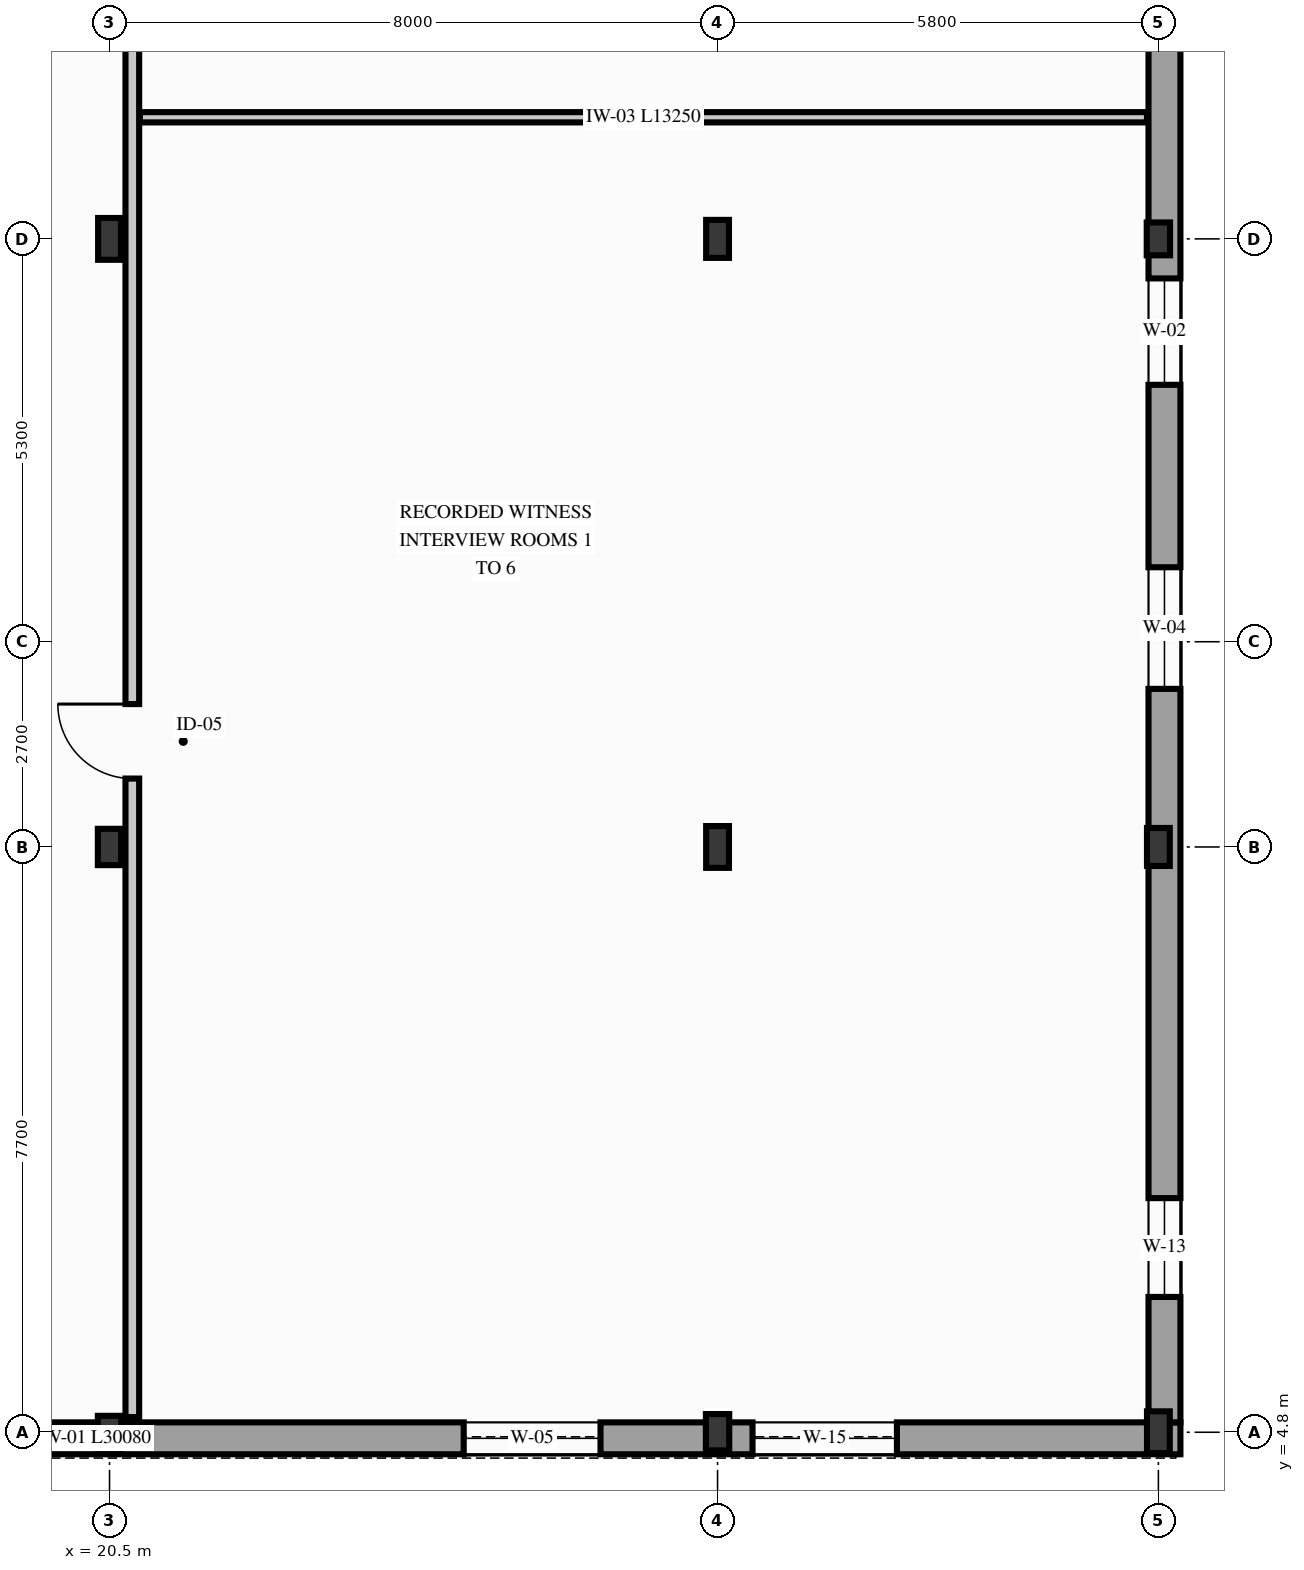
"""IFC4 building model, lengths in metres.
Left out: names, types, materials, properties, quantities, classifications, styles, units other than length and angle.
Written with IfcOpenShell. Run it as: python <this file> out.ifc"""

import sys

from ifc_helpers import new_model, si_unit, direction, frame, frame_2d, origin, origin_2d, place, context, subcontext, project, spatial, rectangle, i_section, extrude, element, fill, save


model = new_model("IFC4")
c1 = context("Model", 3, precision=1e-05, world=origin(), true_north=direction((0.0, 1.0)))
c2 = subcontext(c1, "Body", "Model", "MODEL_VIEW")
j1 = project(units=[si_unit("LENGTHUNIT", "METRE"), si_unit("PLANEANGLEUNIT", "RADIAN")], contexts=[c1])
p1 = place(None, origin())
s1 = spatial("IfcSite", under=j1, at=p1, CompositionType="ELEMENT")
p2 = place(p1, origin())
s2 = spatial("IfcBuilding", under=s1, at=p2, CompositionType="ELEMENT")
p3 = place(p2, frame((0.0, 0.0, 9.3)))
s3 = spatial("IfcBuildingStorey", under=s2, at=p3, CompositionType="ELEMENT", Elevation=9.3)
p4 = place(p3, frame((20.5, 4.8, 0.0), z_axis=(0.0, 0.0, 1.0), x_axis=(1.0, 0.0, 0.0)))
e1 = element("IfcColumn", 1, at=p4, inside=s3, PredefinedType="COLUMN", context=c2, shape_type="SweptSolid", body=[
    extrude(i_section(OverallWidth=0.307, OverallDepth=0.432, WebThickness=0.021, FlangeThickness=0.04, FilletRadius=0.027, at=origin_2d()), origin(), (0.0, 0.0, 1.0), 4.2),
])
p5 = place(p3, frame((20.5, 12.5, 0.0), z_axis=(0.0, 0.0, 1.0), x_axis=(1.0, 0.0, 0.0)))
e2 = element("IfcColumn", 2, at=p5, inside=s3, PredefinedType="COLUMN", context=c2, shape_type="SweptSolid", body=[
    extrude(i_section(OverallWidth=0.307, OverallDepth=0.478, WebThickness=0.021, FlangeThickness=0.04, FilletRadius=0.027, at=origin_2d()), origin(), (0.0, 0.0, 1.0), 4.2),
])
p6 = place(p3, frame((20.5, 20.5, 0.0), z_axis=(0.0, 0.0, 1.0), x_axis=(1.0, 0.0, 0.0)))
e3 = element("IfcColumn", 3, at=p6, inside=s3, PredefinedType="COLUMN", context=c2, shape_type="SweptSolid", body=[
    extrude(i_section(OverallWidth=0.3, OverallDepth=0.55, WebThickness=0.015, FlangeThickness=0.029, FilletRadius=0.027, at=origin_2d()), origin(), (0.0, 0.0, 1.0), 4.2),
])
p7 = place(p3, frame((28.5, 4.8, 0.0), z_axis=(0.0, 0.0, 1.0), x_axis=(1.0, 0.0, 0.0)))
e4 = element("IfcColumn", 4, at=p7, inside=s3, PredefinedType="COLUMN", context=c2, shape_type="SweptSolid", body=[
    extrude(i_section(OverallWidth=0.307, OverallDepth=0.478, WebThickness=0.021, FlangeThickness=0.04, FilletRadius=0.027, at=origin_2d()), origin(), (0.0, 0.0, 1.0), 3.94),
])
p8 = place(p3, frame((28.5, 12.5, 0.0), z_axis=(0.0, 0.0, 1.0), x_axis=(1.0, 0.0, 0.0)))
e5 = element("IfcColumn", 5, at=p8, inside=s3, PredefinedType="COLUMN", context=c2, shape_type="SweptSolid", body=[
    extrude(i_section(OverallWidth=0.3, OverallDepth=0.55, WebThickness=0.015, FlangeThickness=0.029, FilletRadius=0.027, at=origin_2d()), origin(), (0.0, 0.0, 1.0), 3.94),
])
p9 = place(p3, frame((28.5, 20.5, 0.0), z_axis=(0.0, 0.0, 1.0), x_axis=(1.0, 0.0, 0.0)))
e6 = element("IfcColumn", 6, at=p9, inside=s3, PredefinedType="COLUMN", context=c2, shape_type="SweptSolid", body=[
    extrude(i_section(OverallWidth=0.3, OverallDepth=0.5, WebThickness=0.014, FlangeThickness=0.028, FilletRadius=0.027, at=origin_2d()), origin(), (0.0, 0.0, 1.0), 3.94),
])
p10 = place(p3, frame((34.3, 4.8, 0.0), z_axis=(0.0, 0.0, 1.0), x_axis=(1.0, 0.0, 0.0)))
e7 = element("IfcColumn", 7, at=p10, inside=s3, PredefinedType="COLUMN", context=c2, shape_type="SweptSolid", body=[
    extrude(i_section(OverallWidth=0.3, OverallDepth=0.55, WebThickness=0.015, FlangeThickness=0.029, FilletRadius=0.027, at=origin_2d()), origin(), (0.0, 0.0, 1.0), 3.94),
])
p11 = place(p3, frame((34.3, 12.5, 0.0), z_axis=(0.0, 0.0, 1.0), x_axis=(1.0, 0.0, 0.0)))
e8 = element("IfcColumn", 8, at=p11, inside=s3, PredefinedType="COLUMN", context=c2, shape_type="SweptSolid", body=[
    extrude(i_section(OverallWidth=0.3, OverallDepth=0.5, WebThickness=0.014, FlangeThickness=0.028, FilletRadius=0.027, at=origin_2d()), origin(), (0.0, 0.0, 1.0), 3.94),
])
p12 = place(p3, frame((34.3, 20.5, 0.0), z_axis=(0.0, 0.0, 1.0), x_axis=(1.0, 0.0, 0.0)))
e9 = element("IfcColumn", 9, at=p12, inside=s3, PredefinedType="COLUMN", context=c2, shape_type="SweptSolid", body=[
    extrude(i_section(OverallWidth=0.307, OverallDepth=0.432, WebThickness=0.021, FlangeThickness=0.04, FilletRadius=0.027, at=origin_2d()), origin(), (0.0, 0.0, 1.0), 3.94),
])
p13 = place(p3, frame((4.51, 4.72, 0.0), z_axis=(0.0, 0.0, 1.0), x_axis=(1.0, 0.0, 0.0)))
e10 = element("IfcWall", 10, at=p13, inside=s3, PredefinedType="SOLIDWALL", context=c2, shape_type="SweptSolid", body=[
    extrude(rectangle(XDim=30.08, YDim=0.42, at=frame_2d((15.04, 0.0))), origin(), (0.0, 0.0, 1.0), 3.62),
])
p14 = place(p13, frame((1.65, 0.0, 0.85)))
e11 = element("IfcOpeningElement", 11, at=p14, cuts=e10, PredefinedType="OPENING", context=c2, shape_type="SweptSolid", body=[
    extrude(rectangle(XDim=1.3, YDim=2.15, at=frame_2d((0.65, 1.075))), frame((0.0, 0.22, 0.0), z_axis=(0.0, -1.0, 0.0), x_axis=(1.0, 0.0, 0.0)), (0.0, 0.0, 1.0), 0.44),
])
p15 = place(p13, frame((5.45, 0.0, 0.84)))
e12 = element("IfcOpeningElement", 12, at=p15, cuts=e10, PredefinedType="OPENING", context=c2, shape_type="SweptSolid", body=[
    extrude(rectangle(XDim=1.5, YDim=2.3, at=frame_2d((0.75, 1.15))), frame((0.0, 0.22, 0.0), z_axis=(0.0, -1.0, 0.0), x_axis=(1.0, 0.0, 0.0)), (0.0, 0.0, 1.0), 0.44),
])
p16 = place(p13, frame((9.25, 0.0, 0.74)))
e13 = element("IfcOpeningElement", 13, at=p16, cuts=e10, PredefinedType="OPENING", context=c2, shape_type="SweptSolid", body=[
    extrude(rectangle(XDim=1.6, YDim=2.4, at=frame_2d((0.8, 1.2))), frame((0.0, 0.22, 0.0), z_axis=(0.0, -1.0, 0.0), x_axis=(1.0, 0.0, 0.0)), (0.0, 0.0, 1.0), 0.44),
])
p17 = place(p13, frame((20.65, 0.0, 0.74)))
e14 = element("IfcOpeningElement", 14, at=p17, cuts=e10, PredefinedType="OPENING", context=c2, shape_type="SweptSolid", body=[
    extrude(rectangle(XDim=1.8, YDim=2.4, at=frame_2d((0.9, 1.2))), frame((0.0, 0.22, 0.0), z_axis=(0.0, -1.0, 0.0), x_axis=(1.0, 0.0, 0.0)), (0.0, 0.0, 1.0), 0.44),
])
p18 = place(p13, frame((24.45, 0.0, 0.69)))
e15 = element("IfcOpeningElement", 15, at=p18, cuts=e10, PredefinedType="OPENING", context=c2, shape_type="SweptSolid", body=[
    extrude(rectangle(XDim=1.9, YDim=2.45, at=frame_2d((0.95, 1.225))), frame((0.0, 0.22, 0.0), z_axis=(0.0, -1.0, 0.0), x_axis=(1.0, 0.0, 0.0)), (0.0, 0.0, 1.0), 0.44),
])
p19 = place(p3, frame((34.38, 4.93, 0.0), z_axis=(0.0, 0.0, 1.0), x_axis=(0.0, 1.0, 0.0)))
e16 = element("IfcWall", 16, at=p19, inside=s3, PredefinedType="SOLIDWALL", context=c2, shape_type="SweptSolid", body=[
    extrude(rectangle(XDim=31.36, YDim=0.42, at=frame_2d((15.68, 0.0))), origin(), (0.0, 0.0, 1.0), 3.62),
])
p20 = place(p19, frame((1.65, 0.0, 0.85)))
e17 = element("IfcOpeningElement", 17, at=p20, cuts=e16, PredefinedType="OPENING", context=c2, shape_type="SweptSolid", body=[
    extrude(rectangle(XDim=1.3, YDim=2.15, at=frame_2d((0.65, 1.075))), frame((0.0, 0.22, 0.0), z_axis=(0.0, -1.0, 0.0), x_axis=(1.0, 0.0, 0.0)), (0.0, 0.0, 1.0), 0.44),
])
p21 = place(p19, frame((9.65, 0.0, 0.74)))
e18 = element("IfcOpeningElement", 18, at=p21, cuts=e16, PredefinedType="OPENING", context=c2, shape_type="SweptSolid", body=[
    extrude(rectangle(XDim=1.6, YDim=2.4, at=frame_2d((0.8, 1.2))), frame((0.0, 0.22, 0.0), z_axis=(0.0, -1.0, 0.0), x_axis=(1.0, 0.0, 0.0)), (0.0, 0.0, 1.0), 0.44),
])
p22 = place(p19, frame((13.65, 0.0, 0.85)))
e19 = element("IfcOpeningElement", 19, at=p22, cuts=e16, PredefinedType="OPENING", context=c2, shape_type="SweptSolid", body=[
    extrude(rectangle(XDim=1.4, YDim=2.2, at=frame_2d((0.7, 1.1))), frame((0.0, 0.22, 0.0), z_axis=(0.0, -1.0, 0.0), x_axis=(1.0, 0.0, 0.0)), (0.0, 0.0, 1.0), 0.44),
])
p23 = place(p3, frame((20.8, 5.0, 0.0), z_axis=(0.0, 0.0, 1.0), x_axis=(0.0, 1.0, 0.0)))
e20 = element("IfcWall", 20, at=p23, inside=s3, PredefinedType="PARTITIONING", context=c2, shape_type="SweptSolid", body=[
    extrude(rectangle(XDim=31.8, YDim=0.18, at=frame_2d((15.9, 0.0))), origin(), (0.0, 0.0, 1.0), 3.618),
])
p24 = place(p23, frame((8.4, 0.0, 0.0)))
e21 = element("IfcOpeningElement", 21, at=p24, cuts=e20, PredefinedType="OPENING", context=c2, shape_type="SweptSolid", body=[
    extrude(rectangle(XDim=0.98, YDim=2.16, at=frame_2d((0.49, 1.08))), frame((0.0, 0.1, 0.0), z_axis=(0.0, -1.0, 0.0), x_axis=(1.0, 0.0, 0.0)), (0.0, 0.0, 1.0), 0.2),
])
p25 = place(p23, frame((19.5, 0.0, 0.0)))
e22 = element("IfcOpeningElement", 22, at=p25, cuts=e20, PredefinedType="OPENING", context=c2, shape_type="SweptSolid", body=[
    extrude(rectangle(XDim=0.92, YDim=2.12, at=frame_2d((0.46, 1.06))), frame((0.0, 0.1, 0.0), z_axis=(0.0, -1.0, 0.0), x_axis=(1.0, 0.0, 0.0)), (0.0, 0.0, 1.0), 0.2),
])
p26 = place(p23, frame((26.8, 0.0, 0.0)))
e23 = element("IfcOpeningElement", 23, at=p26, cuts=e20, PredefinedType="OPENING", context=c2, shape_type="SweptSolid", body=[
    extrude(rectangle(XDim=1.15, YDim=2.2, at=frame_2d((0.575, 1.1))), frame((0.0, 0.1, 0.0), z_axis=(0.0, -1.0, 0.0), x_axis=(1.0, 0.0, 0.0)), (0.0, 0.0, 1.0), 0.2),
])
p27 = place(p3, frame((20.9, 22.1, 0.0), z_axis=(0.0, 0.0, 1.0), x_axis=(1.0, 0.0, 0.0)))
e24 = element("IfcWall", 24, at=p27, inside=s3, PredefinedType="PARTITIONING", context=c2, shape_type="SweptSolid", body=[
    extrude(rectangle(XDim=13.25, YDim=0.135, at=frame_2d((6.625, 0.0))), origin(), (0.0, 0.0, 1.0), 3.488),
])
p28 = place(p17, origin())
e25 = element("IfcWindow", 25, at=p28, inside=s3, PartitioningType="SINGLE_PANEL", PredefinedType="WINDOW", context=c2, shape_type="SweptSolid", body=[
    extrude(rectangle(XDim=1.8, YDim=2.4, at=frame_2d((0.9, 1.2))), frame((0.0, 0.03, 0.0), z_axis=(0.0, -1.0, 0.0), x_axis=(1.0, 0.0, 0.0)), (0.0, 0.0, 1.0), 0.06),
])
fill(e14, e25)
p29 = place(p18, origin())
e26 = element("IfcWindow", 26, at=p29, inside=s3, PartitioningType="SINGLE_PANEL", PredefinedType="WINDOW", context=c2, shape_type="SweptSolid", body=[
    extrude(rectangle(XDim=1.9, YDim=2.45, at=frame_2d((0.95, 1.225))), frame((0.0, 0.03, 0.0), z_axis=(0.0, -1.0, 0.0), x_axis=(1.0, 0.0, 0.0)), (0.0, 0.0, 1.0), 0.06),
])
fill(e15, e26)
p30 = place(p20, origin())
e27 = element("IfcWindow", 27, at=p30, inside=s3, PartitioningType="SINGLE_PANEL", PredefinedType="WINDOW", context=c2, shape_type="SweptSolid", body=[
    extrude(rectangle(XDim=1.3, YDim=2.15, at=frame_2d((0.65, 1.075))), frame((0.0, 0.03, 0.0), z_axis=(0.0, -1.0, 0.0), x_axis=(1.0, 0.0, 0.0)), (0.0, 0.0, 1.0), 0.06),
])
fill(e17, e27)
p31 = place(p21, origin())
e28 = element("IfcWindow", 28, at=p31, inside=s3, PartitioningType="SINGLE_PANEL", PredefinedType="WINDOW", context=c2, shape_type="SweptSolid", body=[
    extrude(rectangle(XDim=1.6, YDim=2.4, at=frame_2d((0.8, 1.2))), frame((0.0, 0.03, 0.0), z_axis=(0.0, -1.0, 0.0), x_axis=(1.0, 0.0, 0.0)), (0.0, 0.0, 1.0), 0.06),
])
fill(e18, e28)
p32 = place(p22, origin())
e29 = element("IfcWindow", 29, at=p32, inside=s3, PartitioningType="SINGLE_PANEL", PredefinedType="WINDOW", context=c2, shape_type="SweptSolid", body=[
    extrude(rectangle(XDim=1.4, YDim=2.2, at=frame_2d((0.7, 1.1))), frame((0.0, 0.03, 0.0), z_axis=(0.0, -1.0, 0.0), x_axis=(1.0, 0.0, 0.0)), (0.0, 0.0, 1.0), 0.06),
])
fill(e19, e29)
p33 = place(p24, origin())
e30 = element("IfcDoor", 30, at=p33, inside=s3, OperationType="SINGLE_SWING_RIGHT", PredefinedType="DOOR", context=c2, shape_type="SweptSolid", body=[
    extrude(rectangle(XDim=0.98, YDim=2.16, at=frame_2d((0.49, 1.08))), frame((0.0, 0.025, 0.0), z_axis=(0.0, -1.0, 0.0), x_axis=(1.0, 0.0, 0.0)), (0.0, 0.0, 1.0), 0.05),
])
fill(e21, e30)
save(model, sys.argv[1])
